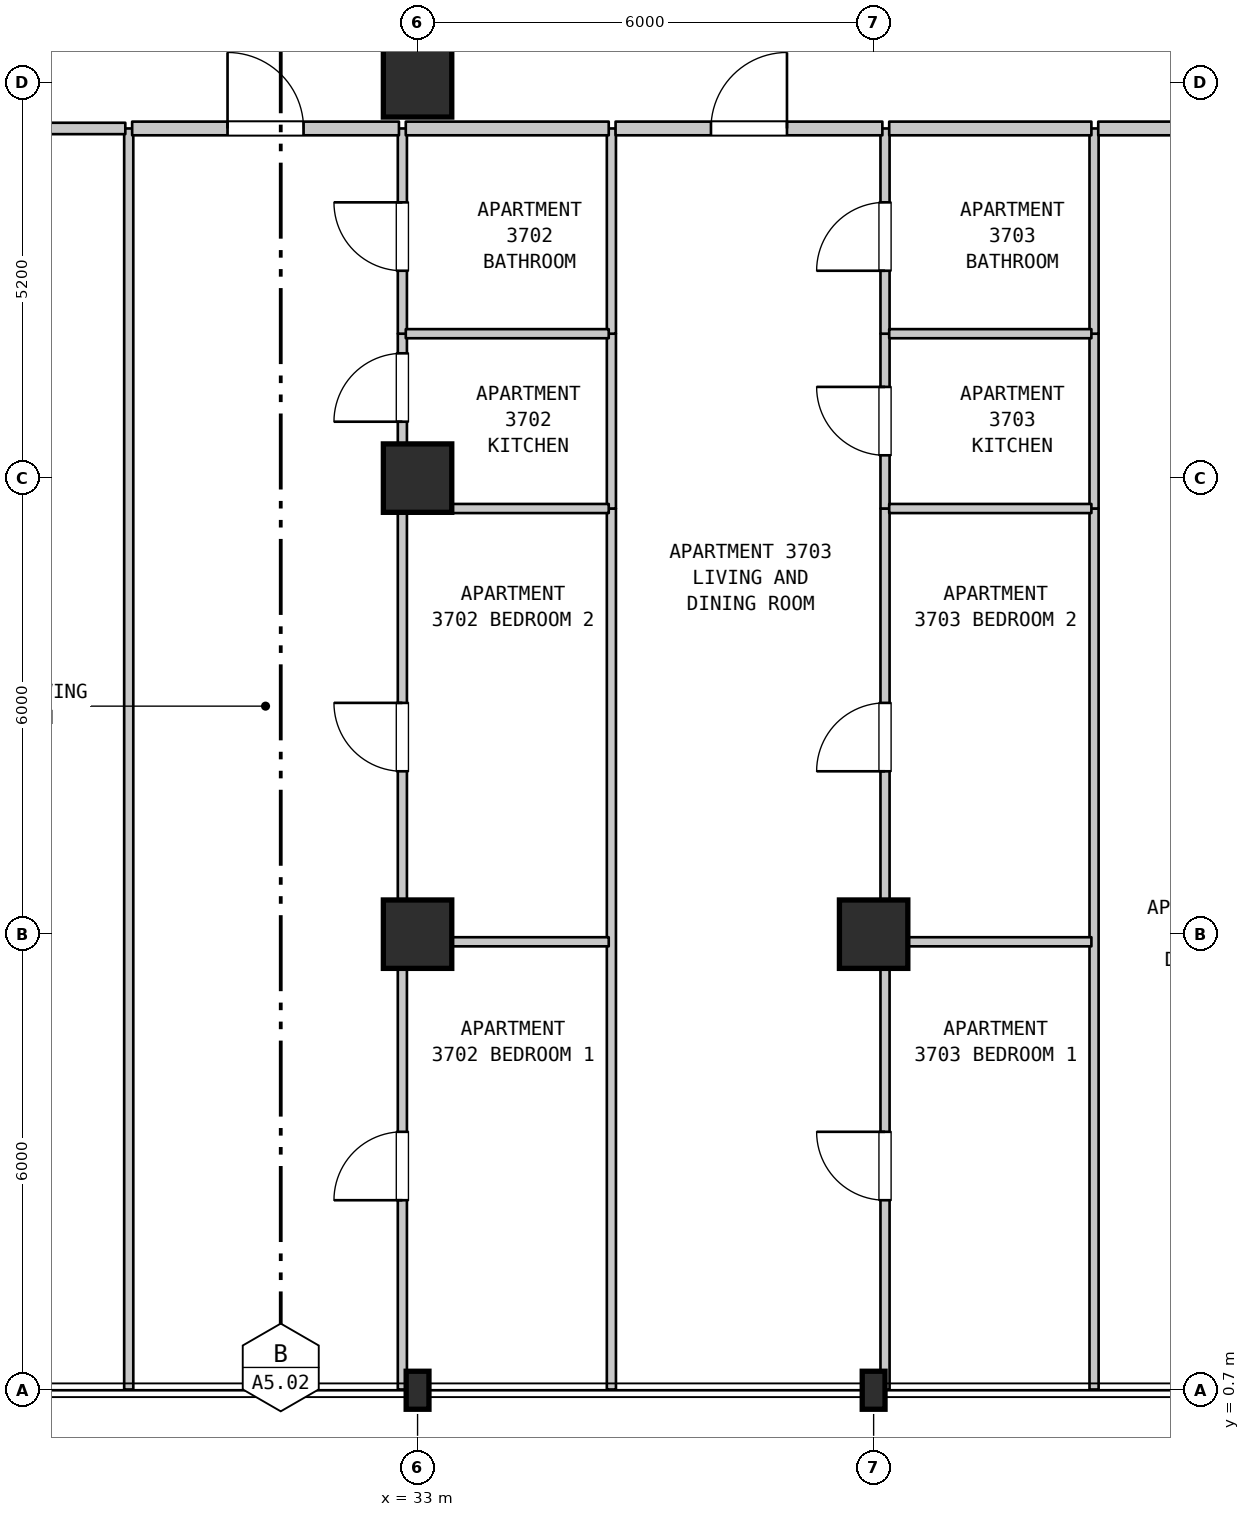
"""IFC4 building model, lengths in metres.
Left out: names, types, materials, properties, quantities, classifications, styles, units other than length and angle.
Written with IfcOpenShell. Run it as: python <this file> out.ifc"""

import sys

from ifc_helpers import new_model, si_unit, direction, frame, frame_2d, origin, origin_2d, place, context, subcontext, project, spatial, rectangle, i_section, extrude, element, fill, save


model = new_model("IFC4")
c1 = context("Model", 3, precision=1e-05, world=origin(), true_north=direction((0.0, 1.0)))
c2 = subcontext(c1, "Body", "Model", "MODEL_VIEW")
j1 = project(units=[si_unit("LENGTHUNIT", "METRE"), si_unit("PLANEANGLEUNIT", "RADIAN")], contexts=[c1])
p1 = place(None, origin())
s1 = spatial("IfcSite", under=j1, at=p1, CompositionType="ELEMENT")
p2 = place(p1, origin())
s2 = spatial("IfcBuilding", under=s1, at=p2, CompositionType="ELEMENT")
p3 = place(p2, frame((0.0, 0.0, 152.0)))
s3 = spatial("IfcBuildingStorey", under=s2, at=p3, CompositionType="ELEMENT", Elevation=152.0)
p4 = place(p3, frame((33.0, 0.7, 0.0), z_axis=(0.0, 0.0, 1.0), x_axis=(1.0, 0.0, 0.0)))
e1 = element("IfcColumn", 1, at=p4, inside=s3, PredefinedType="COLUMN", context=c2, shape_type="SweptSolid", body=[
    extrude(i_section(OverallWidth=0.3, OverallDepth=0.5, WebThickness=0.014, FlangeThickness=0.028, FilletRadius=0.027, at=origin_2d()), origin(), (0.0, 0.0, 1.0), 3.7),
])
for number, where, z_axis, x_axis in (
    (2, (33.0, 6.7, 0.0), (0.0, 0.0, 1.0), (1.0, 0.0, 0.0)),
    (3, (33.0, 12.7, 0.0), (0.0, 0.0, 1.0), (1.0, 0.0, 0.0)),
    (4, (33.0, 17.9, 0.0), (0.0, 0.0, 1.0), (1.0, 0.0, 0.0)),
):
    element("IfcColumn", number, at=place(p3, frame(where, z_axis=z_axis, x_axis=x_axis)), inside=s3, PredefinedType="COLUMN", context=c2, shape_type="SweptSolid", body=[
        extrude(rectangle(XDim=0.9, YDim=0.9, at=origin_2d()), origin(), (0.0, 0.0, 1.0), 3.7),
    ])
p5 = place(p3, frame((39.0, 0.7, 0.0), z_axis=(0.0, 0.0, 1.0), x_axis=(1.0, 0.0, 0.0)))
e5 = element("IfcColumn", 5, at=p5, inside=s3, PredefinedType="COLUMN", context=c2, shape_type="SweptSolid", body=[
    extrude(i_section(OverallWidth=0.3, OverallDepth=0.5, WebThickness=0.014, FlangeThickness=0.028, FilletRadius=0.027, at=origin_2d()), origin(), (0.0, 0.0, 1.0), 3.7),
])
p6 = place(p3, frame((39.0, 6.7, 0.0), z_axis=(0.0, 0.0, 1.0), x_axis=(1.0, 0.0, 0.0)))
e6 = element("IfcColumn", 6, at=p6, inside=s3, PredefinedType="COLUMN", context=c2, shape_type="SweptSolid", body=[
    extrude(rectangle(XDim=0.9, YDim=0.9, at=origin_2d()), origin(), (0.0, 0.0, 1.0), 3.7),
])
p7 = place(p3, frame((29.2, 0.71, 0.0), z_axis=(0.0, 0.0, 1.0), x_axis=(0.0, 1.0, 0.0)))
e7 = element("IfcWall", 7, at=p7, inside=s3, PredefinedType="PARTITIONING", context=c2, shape_type="SweptSolid", body=[
    extrude(rectangle(XDim=16.59, YDim=0.12, at=frame_2d((8.295, 0.0))), origin(), (0.0, 0.0, 1.0), 3.385),
])
p8 = place(p3, frame((32.8, 0.71, 0.0), z_axis=(0.0, 0.0, 1.0), x_axis=(0.0, 1.0, 0.0)))
e8 = element("IfcWall", 8, at=p8, inside=s3, PredefinedType="PARTITIONING", context=c2, shape_type="SweptSolid", body=[
    extrude(rectangle(XDim=11.59, YDim=0.12, at=frame_2d((5.795, 0.0))), origin(), (0.0, 0.0, 1.0), 3.385),
])
p9 = place(p8, frame((2.49, 0.0, 0.0)))
e9 = element("IfcOpeningElement", 9, at=p9, cuts=e8, PredefinedType="OPENING", context=c2, shape_type="SweptSolid", body=[
    extrude(rectangle(XDim=0.9, YDim=2.15, at=frame_2d((0.45, 1.075))), frame((0.0, 0.07, 0.0), z_axis=(0.0, -1.0, 0.0), x_axis=(1.0, 0.0, 0.0)), (0.0, 0.0, 1.0), 0.14),
])
p10 = place(p8, frame((8.133, 0.0, 0.0)))
e10 = element("IfcOpeningElement", 10, at=p10, cuts=e8, PredefinedType="OPENING", context=c2, shape_type="SweptSolid", body=[
    extrude(rectangle(XDim=0.9, YDim=2.15, at=frame_2d((0.45, 1.075))), frame((0.0, 0.07, 0.0), z_axis=(0.0, -1.0, 0.0), x_axis=(1.0, 0.0, 0.0)), (0.0, 0.0, 1.0), 0.14),
])
p11 = place(p3, frame((32.8, 12.3, 0.0), z_axis=(0.0, 0.0, 1.0), x_axis=(0.0, 1.0, 0.0)))
e11 = element("IfcWall", 11, at=p11, inside=s3, PredefinedType="PARTITIONING", context=c2, shape_type="SweptSolid", body=[
    extrude(rectangle(XDim=2.3, YDim=0.12, at=frame_2d((1.15, 0.0))), origin(), (0.0, 0.0, 1.0), 3.385),
])
p12 = place(p11, frame((1.142, 0.0, 0.0)))
e12 = element("IfcOpeningElement", 12, at=p12, cuts=e11, PredefinedType="OPENING", context=c2, shape_type="SweptSolid", body=[
    extrude(rectangle(XDim=0.9, YDim=2.15, at=frame_2d((0.45, 1.075))), frame((0.0, 0.07, 0.0), z_axis=(0.0, -1.0, 0.0), x_axis=(1.0, 0.0, 0.0)), (0.0, 0.0, 1.0), 0.14),
])
p13 = place(p3, frame((32.8, 14.6, 0.0), z_axis=(0.0, 0.0, 1.0), x_axis=(0.0, 1.0, 0.0)))
e13 = element("IfcWall", 13, at=p13, inside=s3, PredefinedType="PARTITIONING", context=c2, shape_type="SweptSolid", body=[
    extrude(rectangle(XDim=2.7, YDim=0.12, at=frame_2d((1.35, 0.0))), origin(), (0.0, 0.0, 1.0), 3.385),
])
p14 = place(p13, frame((0.828, 0.0, 0.0)))
e14 = element("IfcOpeningElement", 14, at=p14, cuts=e13, PredefinedType="OPENING", context=c2, shape_type="SweptSolid", body=[
    extrude(rectangle(XDim=0.9, YDim=2.1, at=frame_2d((0.45, 1.05))), frame((0.0, 0.07, 0.0), z_axis=(0.0, -1.0, 0.0), x_axis=(1.0, 0.0, 0.0)), (0.0, 0.0, 1.0), 0.14),
])
p15 = place(p3, frame((35.55, 0.71, 0.0), z_axis=(0.0, 0.0, 1.0), x_axis=(0.0, 1.0, 0.0)))
e15 = element("IfcWall", 15, at=p15, inside=s3, PredefinedType="PARTITIONING", context=c2, shape_type="SweptSolid", body=[
    extrude(rectangle(XDim=11.59, YDim=0.12, at=frame_2d((5.795, 0.0))), origin(), (0.0, 0.0, 1.0), 3.385),
])
p16 = place(p3, frame((35.55, 12.3, 0.0), z_axis=(0.0, 0.0, 1.0), x_axis=(0.0, 1.0, 0.0)))
e16 = element("IfcWall", 16, at=p16, inside=s3, PredefinedType="PARTITIONING", context=c2, shape_type="SweptSolid", body=[
    extrude(rectangle(XDim=2.3, YDim=0.12, at=frame_2d((1.15, 0.0))), origin(), (0.0, 0.0, 1.0), 3.385),
])
p17 = place(p3, frame((35.55, 14.6, 0.0), z_axis=(0.0, 0.0, 1.0), x_axis=(0.0, 1.0, 0.0)))
e17 = element("IfcWall", 17, at=p17, inside=s3, PredefinedType="PARTITIONING", context=c2, shape_type="SweptSolid", body=[
    extrude(rectangle(XDim=2.7, YDim=0.12, at=frame_2d((1.35, 0.0))), origin(), (0.0, 0.0, 1.0), 3.385),
])
p18 = place(p3, frame((39.15, 0.71, 0.0), z_axis=(0.0, 0.0, 1.0), x_axis=(0.0, 1.0, 0.0)))
e18 = element("IfcWall", 18, at=p18, inside=s3, PredefinedType="PARTITIONING", context=c2, shape_type="SweptSolid", body=[
    extrude(rectangle(XDim=11.59, YDim=0.12, at=frame_2d((5.795, 0.0))), origin(), (0.0, 0.0, 1.0), 3.385),
])
p19 = place(p18, frame((2.49, 0.0, 0.0)))
e19 = element("IfcOpeningElement", 19, at=p19, cuts=e18, PredefinedType="OPENING", context=c2, shape_type="SweptSolid", body=[
    extrude(rectangle(XDim=0.9, YDim=2.15, at=frame_2d((0.45, 1.075))), frame((0.0, 0.07, 0.0), z_axis=(0.0, -1.0, 0.0), x_axis=(1.0, 0.0, 0.0)), (0.0, 0.0, 1.0), 0.14),
])
p20 = place(p18, frame((8.133, 0.0, 0.0)))
e20 = element("IfcOpeningElement", 20, at=p20, cuts=e18, PredefinedType="OPENING", context=c2, shape_type="SweptSolid", body=[
    extrude(rectangle(XDim=0.9, YDim=2.15, at=frame_2d((0.45, 1.075))), frame((0.0, 0.07, 0.0), z_axis=(0.0, -1.0, 0.0), x_axis=(1.0, 0.0, 0.0)), (0.0, 0.0, 1.0), 0.14),
])
p21 = place(p3, frame((39.15, 12.3, 0.0), z_axis=(0.0, 0.0, 1.0), x_axis=(0.0, 1.0, 0.0)))
e21 = element("IfcWall", 21, at=p21, inside=s3, PredefinedType="PARTITIONING", context=c2, shape_type="SweptSolid", body=[
    extrude(rectangle(XDim=2.3, YDim=0.12, at=frame_2d((1.15, 0.0))), origin(), (0.0, 0.0, 1.0), 3.385),
])
p22 = place(p21, frame((0.7, 0.0, 0.0)))
e22 = element("IfcOpeningElement", 22, at=p22, cuts=e21, PredefinedType="OPENING", context=c2, shape_type="SweptSolid", body=[
    extrude(rectangle(XDim=0.9, YDim=2.15, at=frame_2d((0.45, 1.075))), frame((0.0, 0.07, 0.0), z_axis=(0.0, -1.0, 0.0), x_axis=(1.0, 0.0, 0.0)), (0.0, 0.0, 1.0), 0.14),
])
p23 = place(p3, frame((39.15, 14.6, 0.0), z_axis=(0.0, 0.0, 1.0), x_axis=(0.0, 1.0, 0.0)))
e23 = element("IfcWall", 23, at=p23, inside=s3, PredefinedType="PARTITIONING", context=c2, shape_type="SweptSolid", body=[
    extrude(rectangle(XDim=2.7, YDim=0.12, at=frame_2d((1.35, 0.0))), origin(), (0.0, 0.0, 1.0), 3.385),
])
p24 = place(p23, frame((0.828, 0.0, 0.0)))
e24 = element("IfcOpeningElement", 24, at=p24, cuts=e23, PredefinedType="OPENING", context=c2, shape_type="SweptSolid", body=[
    extrude(rectangle(XDim=0.9, YDim=2.1, at=frame_2d((0.45, 1.05))), frame((0.0, 0.07, 0.0), z_axis=(0.0, -1.0, 0.0), x_axis=(1.0, 0.0, 0.0)), (0.0, 0.0, 1.0), 0.14),
])
p25 = place(p3, frame((41.9, 0.71, 0.0), z_axis=(0.0, 0.0, 1.0), x_axis=(0.0, 1.0, 0.0)))
e25 = element("IfcWall", 25, at=p25, inside=s3, PredefinedType="PARTITIONING", context=c2, shape_type="SweptSolid", body=[
    extrude(rectangle(XDim=11.59, YDim=0.12, at=frame_2d((5.795, 0.0))), origin(), (0.0, 0.0, 1.0), 3.385),
])
p26 = place(p3, frame((41.9, 12.3, 0.0), z_axis=(0.0, 0.0, 1.0), x_axis=(0.0, 1.0, 0.0)))
e26 = element("IfcWall", 26, at=p26, inside=s3, PredefinedType="PARTITIONING", context=c2, shape_type="SweptSolid", body=[
    extrude(rectangle(XDim=2.3, YDim=0.12, at=frame_2d((1.15, 0.0))), origin(), (0.0, 0.0, 1.0), 3.385),
])
p27 = place(p3, frame((41.9, 14.6, 0.0), z_axis=(0.0, 0.0, 1.0), x_axis=(0.0, 1.0, 0.0)))
e27 = element("IfcWall", 27, at=p27, inside=s3, PredefinedType="PARTITIONING", context=c2, shape_type="SweptSolid", body=[
    extrude(rectangle(XDim=2.7, YDim=0.12, at=frame_2d((1.35, 0.0))), origin(), (0.0, 0.0, 1.0), 3.385),
])
p28 = place(p3, frame((32.845, 6.6, 0.0), z_axis=(0.0, 0.0, 1.0), x_axis=(1.0, 0.0, 0.0)))
e28 = element("IfcWall", 28, at=p28, inside=s3, PredefinedType="PARTITIONING", context=c2, shape_type="SweptSolid", body=[
    extrude(rectangle(XDim=2.67, YDim=0.12, at=frame_2d((1.335, 0.0))), origin(), (0.0, 0.0, 1.0), 2.935),
])
p29 = place(p3, frame((39.205, 6.6, 0.0), z_axis=(0.0, 0.0, 1.0), x_axis=(1.0, 0.0, 0.0)))
e29 = element("IfcWall", 29, at=p29, inside=s3, PredefinedType="PARTITIONING", context=c2, shape_type="SweptSolid", body=[
    extrude(rectangle(XDim=2.66, YDim=0.12, at=frame_2d((1.33, 0.0))), origin(), (0.0, 0.0, 1.0), 2.785),
])
p30 = place(p3, frame((32.845, 12.3, 0.0), z_axis=(0.0, 0.0, 1.0), x_axis=(1.0, 0.0, 0.0)))
e30 = element("IfcWall", 30, at=p30, inside=s3, PredefinedType="PARTITIONING", context=c2, shape_type="SweptSolid", body=[
    extrude(rectangle(XDim=2.67, YDim=0.12, at=frame_2d((1.335, 0.0))), origin(), (0.0, 0.0, 1.0), 3.385),
])
p31 = place(p3, frame((39.205, 12.3, 0.0), z_axis=(0.0, 0.0, 1.0), x_axis=(1.0, 0.0, 0.0)))
e31 = element("IfcWall", 31, at=p31, inside=s3, PredefinedType="PARTITIONING", context=c2, shape_type="SweptSolid", body=[
    extrude(rectangle(XDim=2.66, YDim=0.12, at=frame_2d((1.33, 0.0))), origin(), (0.0, 0.0, 1.0), 3.385),
])
p32 = place(p3, frame((32.845, 14.6, 0.0), z_axis=(0.0, 0.0, 1.0), x_axis=(1.0, 0.0, 0.0)))
e32 = element("IfcWall", 32, at=p32, inside=s3, PredefinedType="PARTITIONING", context=c2, shape_type="SweptSolid", body=[
    extrude(rectangle(XDim=2.67, YDim=0.12, at=frame_2d((1.335, 0.0))), origin(), (0.0, 0.0, 1.0), 3.385),
])
p33 = place(p3, frame((39.205, 14.6, 0.0), z_axis=(0.0, 0.0, 1.0), x_axis=(1.0, 0.0, 0.0)))
e33 = element("IfcWall", 33, at=p33, inside=s3, PredefinedType="PARTITIONING", context=c2, shape_type="SweptSolid", body=[
    extrude(rectangle(XDim=2.66, YDim=0.12, at=frame_2d((1.33, 0.0))), origin(), (0.0, 0.0, 1.0), 3.385),
])
p34 = place(p3, frame((25.045, 17.3, 0.0), z_axis=(0.0, 0.0, 1.0), x_axis=(1.0, 0.0, 0.0)))
e34 = element("IfcWall", 34, at=p34, inside=s3, PredefinedType="STANDARD", context=c2, shape_type="SweptSolid", body=[
    extrude(rectangle(XDim=4.11, YDim=0.15, at=frame_2d((2.055, 0.0))), origin(), (0.0, 0.0, 1.0), 3.385),
])
p35 = place(p34, frame((1.483, 0.0, 0.0)))
e35 = element("IfcOpeningElement", 35, at=p35, cuts=e34, PredefinedType="OPENING", context=c2, shape_type="SweptSolid", body=[
    extrude(rectangle(XDim=1.0, YDim=2.15, at=frame_2d((0.5, 1.075))), frame((0.0, 0.085, 0.0), z_axis=(0.0, -1.0, 0.0), x_axis=(1.0, 0.0, 0.0)), (0.0, 0.0, 1.0), 0.17),
])
p36 = place(p3, frame((29.245, 17.3, 0.0), z_axis=(0.0, 0.0, 1.0), x_axis=(1.0, 0.0, 0.0)))
e36 = element("IfcWall", 36, at=p36, inside=s3, PredefinedType="STANDARD", context=c2, shape_type="SweptSolid", body=[
    extrude(rectangle(XDim=3.51, YDim=0.18, at=frame_2d((1.755, 0.0))), origin(), (0.0, 0.0, 1.0), 3.385),
])
p37 = place(p36, frame((1.255, 0.0, 0.0)))
e37 = element("IfcOpeningElement", 37, at=p37, cuts=e36, PredefinedType="OPENING", context=c2, shape_type="SweptSolid", body=[
    extrude(rectangle(XDim=1.0, YDim=2.15, at=frame_2d((0.5, 1.075))), frame((0.0, 0.1, 0.0), z_axis=(0.0, -1.0, 0.0), x_axis=(1.0, 0.0, 0.0)), (0.0, 0.0, 1.0), 0.2),
])
p38 = place(p3, frame((32.845, 17.3, 0.0), z_axis=(0.0, 0.0, 1.0), x_axis=(1.0, 0.0, 0.0)))
e38 = element("IfcWall", 38, at=p38, inside=s3, PredefinedType="STANDARD", context=c2, shape_type="SweptSolid", body=[
    extrude(rectangle(XDim=2.67, YDim=0.18, at=frame_2d((1.335, 0.0))), origin(), (0.0, 0.0, 1.0), 3.385),
])
p39 = place(p3, frame((35.605, 17.3, 0.0), z_axis=(0.0, 0.0, 1.0), x_axis=(1.0, 0.0, 0.0)))
e39 = element("IfcWall", 39, at=p39, inside=s3, PredefinedType="STANDARD", context=c2, shape_type="SweptSolid", body=[
    extrude(rectangle(XDim=3.51, YDim=0.18, at=frame_2d((1.755, 0.0))), origin(), (0.0, 0.0, 1.0), 3.385),
])
p40 = place(p39, frame((1.255, 0.0, 0.0)))
e40 = element("IfcOpeningElement", 40, at=p40, cuts=e39, PredefinedType="OPENING", context=c2, shape_type="SweptSolid", body=[
    extrude(rectangle(XDim=1.0, YDim=2.15, at=frame_2d((0.5, 1.075))), frame((0.0, 0.1, 0.0), z_axis=(0.0, -1.0, 0.0), x_axis=(1.0, 0.0, 0.0)), (0.0, 0.0, 1.0), 0.2),
])
p41 = place(p3, frame((39.205, 17.3, 0.0), z_axis=(0.0, 0.0, 1.0), x_axis=(1.0, 0.0, 0.0)))
e41 = element("IfcWall", 41, at=p41, inside=s3, PredefinedType="STANDARD", context=c2, shape_type="SweptSolid", body=[
    extrude(rectangle(XDim=2.66, YDim=0.18, at=frame_2d((1.33, 0.0))), origin(), (0.0, 0.0, 1.0), 3.385),
])
p42 = place(p3, frame((41.955, 17.3, 0.0), z_axis=(0.0, 0.0, 1.0), x_axis=(1.0, 0.0, 0.0)))
e42 = element("IfcWall", 42, at=p42, inside=s3, PredefinedType="STANDARD", context=c2, shape_type="SweptSolid", body=[
    extrude(rectangle(XDim=3.51, YDim=0.18, at=frame_2d((1.755, 0.0))), origin(), (0.0, 0.0, 1.0), 3.385),
])
p43 = place(p42, frame((1.185, 0.0, 0.0)))
e43 = element("IfcOpeningElement", 43, at=p43, cuts=e42, PredefinedType="OPENING", context=c2, shape_type="SweptSolid", body=[
    extrude(rectangle(XDim=1.0, YDim=2.15, at=frame_2d((0.5, 1.075))), frame((0.0, 0.1, 0.0), z_axis=(0.0, -1.0, 0.0), x_axis=(1.0, 0.0, 0.0)), (0.0, 0.0, 1.0), 0.2),
])
p44 = place(p9, origin())
e44 = element("IfcDoor", 44, at=p44, inside=s3, OperationType="SINGLE_SWING_LEFT", PredefinedType="DOOR", context=c2, shape_type="SweptSolid", body=[
    extrude(rectangle(XDim=0.9, YDim=2.15, at=frame_2d((0.45, 1.075))), frame((0.0, 0.025, 0.0), z_axis=(0.0, -1.0, 0.0), x_axis=(1.0, 0.0, 0.0)), (0.0, 0.0, 1.0), 0.05),
])
fill(e9, e44)
p45 = place(p10, origin())
e45 = element("IfcDoor", 45, at=p45, inside=s3, OperationType="SINGLE_SWING_RIGHT", PredefinedType="DOOR", context=c2, shape_type="SweptSolid", body=[
    extrude(rectangle(XDim=0.9, YDim=2.15, at=frame_2d((0.45, 1.075))), frame((0.0, 0.025, 0.0), z_axis=(0.0, -1.0, 0.0), x_axis=(1.0, 0.0, 0.0)), (0.0, 0.0, 1.0), 0.05),
])
fill(e10, e45)
p46 = place(p12, origin())
e46 = element("IfcDoor", 46, at=p46, inside=s3, OperationType="SINGLE_SWING_LEFT", PredefinedType="DOOR", context=c2, shape_type="SweptSolid", body=[
    extrude(rectangle(XDim=0.9, YDim=2.15, at=frame_2d((0.45, 1.075))), frame((0.0, 0.025, 0.0), z_axis=(0.0, -1.0, 0.0), x_axis=(1.0, 0.0, 0.0)), (0.0, 0.0, 1.0), 0.05),
])
fill(e12, e46)
p47 = place(p14, origin())
e47 = element("IfcDoor", 47, at=p47, inside=s3, OperationType="SINGLE_SWING_RIGHT", PredefinedType="DOOR", context=c2, shape_type="SweptSolid", body=[
    extrude(rectangle(XDim=0.9, YDim=2.1, at=frame_2d((0.45, 1.05))), frame((0.0, 0.025, 0.0), z_axis=(0.0, -1.0, 0.0), x_axis=(1.0, 0.0, 0.0)), (0.0, 0.0, 1.0), 0.05),
])
fill(e14, e47)
p48 = place(p19, origin())
e48 = element("IfcDoor", 48, at=p48, inside=s3, OperationType="SINGLE_SWING_RIGHT", PredefinedType="DOOR", context=c2, shape_type="SweptSolid", body=[
    extrude(rectangle(XDim=0.9, YDim=2.15, at=frame_2d((0.45, 1.075))), frame((0.0, 0.025, 0.0), z_axis=(0.0, -1.0, 0.0), x_axis=(1.0, 0.0, 0.0)), (0.0, 0.0, 1.0), 0.05),
])
fill(e19, e48)
p49 = place(p20, origin())
e49 = element("IfcDoor", 49, at=p49, inside=s3, OperationType="SINGLE_SWING_LEFT", PredefinedType="DOOR", context=c2, shape_type="SweptSolid", body=[
    extrude(rectangle(XDim=0.9, YDim=2.15, at=frame_2d((0.45, 1.075))), frame((0.0, 0.025, 0.0), z_axis=(0.0, -1.0, 0.0), x_axis=(1.0, 0.0, 0.0)), (0.0, 0.0, 1.0), 0.05),
])
fill(e20, e49)
p50 = place(p22, origin())
e50 = element("IfcDoor", 50, at=p50, inside=s3, OperationType="SINGLE_SWING_RIGHT", PredefinedType="DOOR", context=c2, shape_type="SweptSolid", body=[
    extrude(rectangle(XDim=0.9, YDim=2.15, at=frame_2d((0.45, 1.075))), frame((0.0, 0.025, 0.0), z_axis=(0.0, -1.0, 0.0), x_axis=(1.0, 0.0, 0.0)), (0.0, 0.0, 1.0), 0.05),
])
fill(e22, e50)
p51 = place(p24, origin())
e51 = element("IfcDoor", 51, at=p51, inside=s3, OperationType="SINGLE_SWING_LEFT", PredefinedType="DOOR", context=c2, shape_type="SweptSolid", body=[
    extrude(rectangle(XDim=0.9, YDim=2.1, at=frame_2d((0.45, 1.05))), frame((0.0, 0.025, 0.0), z_axis=(0.0, -1.0, 0.0), x_axis=(1.0, 0.0, 0.0)), (0.0, 0.0, 1.0), 0.05),
])
fill(e24, e51)
p52 = place(p37, origin())
e52 = element("IfcDoor", 52, at=p52, inside=s3, OperationType="SINGLE_SWING_LEFT", PredefinedType="DOOR", context=c2, shape_type="SweptSolid", body=[
    extrude(rectangle(XDim=1.0, YDim=2.15, at=frame_2d((0.5, 1.075))), frame((0.0, 0.025, 0.0), z_axis=(0.0, -1.0, 0.0), x_axis=(1.0, 0.0, 0.0)), (0.0, 0.0, 1.0), 0.05),
])
fill(e37, e52)
p53 = place(p40, origin())
e53 = element("IfcDoor", 53, at=p53, inside=s3, OperationType="SINGLE_SWING_RIGHT", PredefinedType="DOOR", context=c2, shape_type="SweptSolid", body=[
    extrude(rectangle(XDim=1.0, YDim=2.15, at=frame_2d((0.5, 1.075))), frame((0.0, 0.025, 0.0), z_axis=(0.0, -1.0, 0.0), x_axis=(1.0, 0.0, 0.0)), (0.0, 0.0, 1.0), 0.05),
])
fill(e40, e53)
save(model, sys.argv[1])
